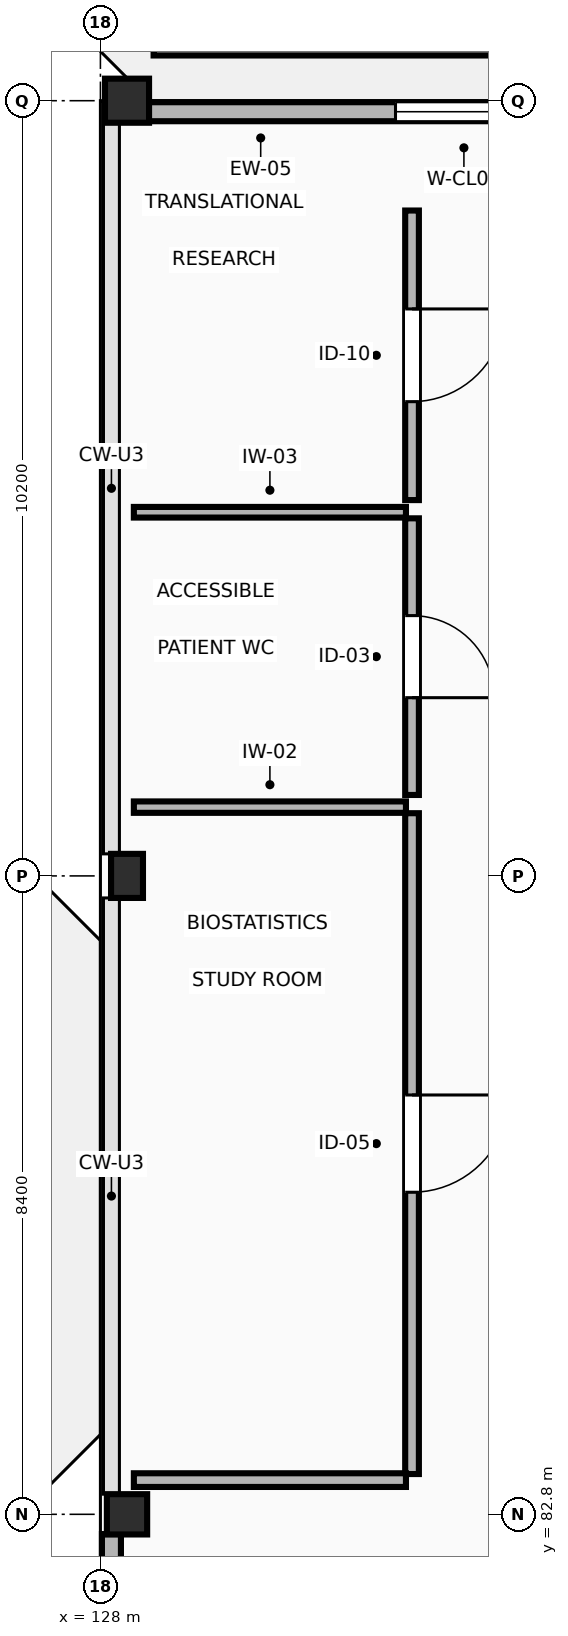
"""IFC4 building model, lengths in metres.
Left out: names, types, materials, properties, quantities, classifications, styles, units other than length and angle.
Written with IfcOpenShell. Run it as: python <this file> out.ifc"""

import sys

from ifc_helpers import new_model, si_unit, direction, frame, frame_2d, origin, origin_2d, place, context, subcontext, project, spatial, rectangle, extrude, element, fill, save


model = new_model("IFC4")
c1 = context("Model", 3, precision=1e-05, world=origin(), true_north=direction((0.0, 1.0)))
c2 = subcontext(c1, "Body", "Model", "MODEL_VIEW")
j1 = project(units=[si_unit("LENGTHUNIT", "METRE"), si_unit("PLANEANGLEUNIT", "RADIAN")], contexts=[c1])
p1 = place(None, origin())
s1 = spatial("IfcSite", under=j1, at=p1, CompositionType="ELEMENT")
p2 = place(p1, origin())
s2 = spatial("IfcBuilding", under=s1, at=p2, CompositionType="ELEMENT")
p3 = place(p2, frame((0.0, 0.0, 5.4)))
s3 = spatial("IfcBuildingStorey", under=s2, at=p3, CompositionType="ELEMENT", Elevation=5.4)
p4 = place(p3, frame((128.35, 82.8, 0.0), z_axis=(0.0, 0.0, 1.0), x_axis=(1.0, 0.0, 0.0)))
e1 = element("IfcColumn", 1, at=p4, inside=s3, PredefinedType="COLUMN", context=c2, shape_type="SweptSolid", body=[
    extrude(rectangle(XDim=0.53, YDim=0.53, at=origin_2d()), origin(), (0.0, 0.0, 1.0), 4.2),
])
p5 = place(p3, frame((128.35, 91.2, 0.0), z_axis=(0.0, 0.0, 1.0), x_axis=(1.0, 0.0, 0.0)))
e2 = element("IfcColumn", 2, at=p5, inside=s3, PredefinedType="COLUMN", context=c2, shape_type="SweptSolid", body=[
    extrude(rectangle(XDim=0.42, YDim=0.58, at=origin_2d()), origin(), (0.0, 0.0, 1.0), 4.2),
])
p6 = place(p3, frame((128.35, 101.4, 0.0), z_axis=(0.0, 0.0, 1.0), x_axis=(1.0, 0.0, 0.0)))
e3 = element("IfcColumn", 3, at=p6, inside=s3, PredefinedType="COLUMN", context=c2, shape_type="SweptSolid", body=[
    extrude(rectangle(XDim=0.58, YDim=0.58, at=origin_2d()), origin(), (0.0, 0.0, 1.0), 4.2),
])
p7 = place(p3, frame((136.93, 101.255, 0.0), z_axis=(0.0, 0.0, 1.0), x_axis=(-1.0, 0.0, 0.0)))
e4 = element("IfcWall", 4, at=p7, inside=s3, PredefinedType="STANDARD", context=c2, shape_type="SweptSolid", body=[
    extrude(rectangle(XDim=8.295, YDim=0.25, at=frame_2d((4.147, 0.0))), origin(), (0.0, 0.0, 1.0), 3.185),
])
p8 = place(p7, frame((3.248, 0.0, 0.95)))
e5 = element("IfcOpeningElement", 5, at=p8, cuts=e4, PredefinedType="OPENING", context=c2, shape_type="SweptSolid", body=[
    extrude(rectangle(XDim=1.8, YDim=1.5, at=frame_2d((0.9, 0.75))), frame((0.0, 0.135, 0.0), z_axis=(0.0, -1.0, 0.0), x_axis=(1.0, 0.0, 0.0)), (0.0, 0.0, 1.0), 0.27),
])
p9 = place(p3, frame((128.145, 82.54, 0.0), z_axis=(0.0, 0.0, 1.0), x_axis=(0.0, -1.0, 0.0)))
e6 = element("IfcWall", 6, at=p9, inside=s3, PredefinedType="STANDARD", context=c2, shape_type="SweptSolid", body=[
    extrude(rectangle(XDim=9.085, YDim=0.25, at=frame_2d((4.542, 0.0))), origin(), (0.0, 0.0, 1.0), 3.245),
])
p10 = place(p9, frame((2.0, 0.0, 0.95)))
e7 = element("IfcOpeningElement", 7, at=p10, cuts=e6, PredefinedType="OPENING", context=c2, shape_type="SweptSolid", body=[
    extrude(rectangle(XDim=1.45, YDim=1.7, at=frame_2d((0.725, 0.85))), frame((0.0, 0.135, 0.0), z_axis=(0.0, -1.0, 0.0), x_axis=(1.0, 0.0, 0.0)), (0.0, 0.0, 1.0), 0.27),
])
p11 = place(p9, frame((5.635, 0.0, 0.95)))
e8 = element("IfcOpeningElement", 8, at=p11, cuts=e6, PredefinedType="OPENING", context=c2, shape_type="SweptSolid", body=[
    extrude(rectangle(XDim=1.45, YDim=1.7, at=frame_2d((0.725, 0.85))), frame((0.0, 0.135, 0.0), z_axis=(0.0, -1.0, 0.0), x_axis=(1.0, 0.0, 0.0)), (0.0, 0.0, 1.0), 0.27),
])
p12 = place(p3, frame((128.7, 102.1, 0.0), z_axis=(0.0, 0.0, 1.0), x_axis=(1.0, 0.0, 0.0)))
e9 = element("IfcWall", 9, at=p12, inside=s3, PredefinedType="PARAPET", context=c2, shape_type="SweptSolid", body=[
    extrude(rectangle(XDim=35.65, YDim=0.21, at=frame_2d((17.825, 0.0))), origin(), (0.0, 0.0, 1.0), 1.05),
])
p13 = place(p3, frame((128.44, 92.105, 0.0), z_axis=(0.0, 0.0, 1.0), x_axis=(1.0, 0.0, 0.0)))
e10 = element("IfcWall", 10, at=p13, inside=s3, PredefinedType="PARTITIONING", context=c2, shape_type="SweptSolid", body=[
    extrude(rectangle(XDim=3.58, YDim=0.15, at=frame_2d((1.79, 0.0))), origin(), (0.0, 0.0, 1.0), 3.9),
])
p14 = place(p3, frame((132.1, 92.025, 0.0), z_axis=(0.0, 0.0, 1.0), x_axis=(0.0, -1.0, 0.0)))
e11 = element("IfcWall", 11, at=p14, inside=s3, PredefinedType="PARTITIONING", context=c2, shape_type="SweptSolid", body=[
    extrude(rectangle(XDim=8.695, YDim=0.18, at=frame_2d((4.347, 0.0))), origin(), (0.0, 0.0, 1.0), 3.9),
])
p15 = place(p14, frame((3.708, 0.0, 0.0)))
e12 = element("IfcOpeningElement", 12, at=p15, cuts=e11, PredefinedType="OPENING", context=c2, shape_type="SweptSolid", body=[
    extrude(rectangle(XDim=1.28, YDim=2.25, at=frame_2d((0.64, 1.125))), frame((0.0, 0.1, 0.0), z_axis=(0.0, -1.0, 0.0), x_axis=(1.0, 0.0, 0.0)), (0.0, 0.0, 1.0), 0.2),
])
p16 = place(p3, frame((132.02, 83.25, 0.0), z_axis=(0.0, 0.0, 1.0), x_axis=(-1.0, 0.0, 0.0)))
e13 = element("IfcWall", 13, at=p16, inside=s3, PredefinedType="PARTITIONING", context=c2, shape_type="SweptSolid", body=[
    extrude(rectangle(XDim=3.58, YDim=0.18, at=frame_2d((1.79, 0.0))), origin(), (0.0, 0.0, 1.0), 3.235),
])
p17 = place(p3, frame((128.44, 95.985, 0.0), z_axis=(0.0, 0.0, 1.0), x_axis=(1.0, 0.0, 0.0)))
e14 = element("IfcWall", 14, at=p17, inside=s3, PredefinedType="PARTITIONING", context=c2, shape_type="SweptSolid", body=[
    extrude(rectangle(XDim=3.58, YDim=0.14, at=frame_2d((1.79, 0.0))), origin(), (0.0, 0.0, 1.0), 3.9),
])
p18 = place(p3, frame((132.1, 95.905, 0.0), z_axis=(0.0, 0.0, 1.0), x_axis=(0.0, -1.0, 0.0)))
e15 = element("IfcWall", 15, at=p18, inside=s3, PredefinedType="PARTITIONING", context=c2, shape_type="SweptSolid", body=[
    extrude(rectangle(XDim=3.64, YDim=0.18, at=frame_2d((1.82, 0.0))), origin(), (0.0, 0.0, 1.0), 3.9),
])
p19 = place(p18, frame((1.28, 0.0, 0.0)))
e16 = element("IfcOpeningElement", 16, at=p19, cuts=e15, PredefinedType="OPENING", context=c2, shape_type="SweptSolid", body=[
    extrude(rectangle(XDim=1.08, YDim=2.2, at=frame_2d((0.54, 1.1))), frame((0.0, 0.1, 0.0), z_axis=(0.0, -1.0, 0.0), x_axis=(1.0, 0.0, 0.0)), (0.0, 0.0, 1.0), 0.2),
])
p20 = place(p3, frame((132.1, 99.955, 0.0), z_axis=(0.0, 0.0, 1.0), x_axis=(0.0, -1.0, 0.0)))
e17 = element("IfcWall", 17, at=p20, inside=s3, PredefinedType="PARTITIONING", context=c2, shape_type="SweptSolid", body=[
    extrude(rectangle(XDim=3.81, YDim=0.18, at=frame_2d((1.905, 0.0))), origin(), (0.0, 0.0, 1.0), 3.9),
])
p21 = place(p20, frame((1.295, 0.0, 0.0)))
e18 = element("IfcOpeningElement", 18, at=p21, cuts=e17, PredefinedType="OPENING", context=c2, shape_type="SweptSolid", body=[
    extrude(rectangle(XDim=1.22, YDim=2.18, at=frame_2d((0.61, 1.09))), frame((0.0, 0.1, 0.0), z_axis=(0.0, -1.0, 0.0), x_axis=(1.0, 0.0, 0.0)), (0.0, 0.0, 1.0), 0.2),
])
p22 = place(p8, origin())
e19 = element("IfcWindow", 19, at=p22, inside=s3, PartitioningType="SINGLE_PANEL", PredefinedType="WINDOW", context=c2, shape_type="SweptSolid", body=[
    extrude(rectangle(XDim=1.8, YDim=1.5, at=frame_2d((0.9, 0.75))), frame((0.0, 0.03, 0.0), z_axis=(0.0, -1.0, 0.0), x_axis=(1.0, 0.0, 0.0)), (0.0, 0.0, 1.0), 0.06),
])
fill(e5, e19)
p23 = place(p15, origin())
e20 = element("IfcDoor", 20, at=p23, inside=s3, OperationType="SINGLE_SWING_LEFT", PredefinedType="DOOR", context=c2, shape_type="SweptSolid", body=[
    extrude(rectangle(XDim=1.28, YDim=2.25, at=frame_2d((0.64, 1.125))), frame((0.0, 0.025, 0.0), z_axis=(0.0, -1.0, 0.0), x_axis=(1.0, 0.0, 0.0)), (0.0, 0.0, 1.0), 0.05),
])
fill(e12, e20)
p24 = place(p19, origin())
e21 = element("IfcDoor", 21, at=p24, inside=s3, OperationType="SINGLE_SWING_RIGHT", PredefinedType="DOOR", context=c2, shape_type="SweptSolid", body=[
    extrude(rectangle(XDim=1.08, YDim=2.2, at=frame_2d((0.54, 1.1))), frame((0.0, 0.025, 0.0), z_axis=(0.0, -1.0, 0.0), x_axis=(1.0, 0.0, 0.0)), (0.0, 0.0, 1.0), 0.05),
])
fill(e16, e21)
p25 = place(p21, origin())
e22 = element("IfcDoor", 22, at=p25, inside=s3, OperationType="SINGLE_SWING_LEFT", PredefinedType="DOOR", context=c2, shape_type="SweptSolid", body=[
    extrude(rectangle(XDim=1.22, YDim=2.18, at=frame_2d((0.61, 1.09))), frame((0.0, 0.025, 0.0), z_axis=(0.0, -1.0, 0.0), x_axis=(1.0, 0.0, 0.0)), (0.0, 0.0, 1.0), 0.05),
])
fill(e18, e22)
save(model, sys.argv[1])
